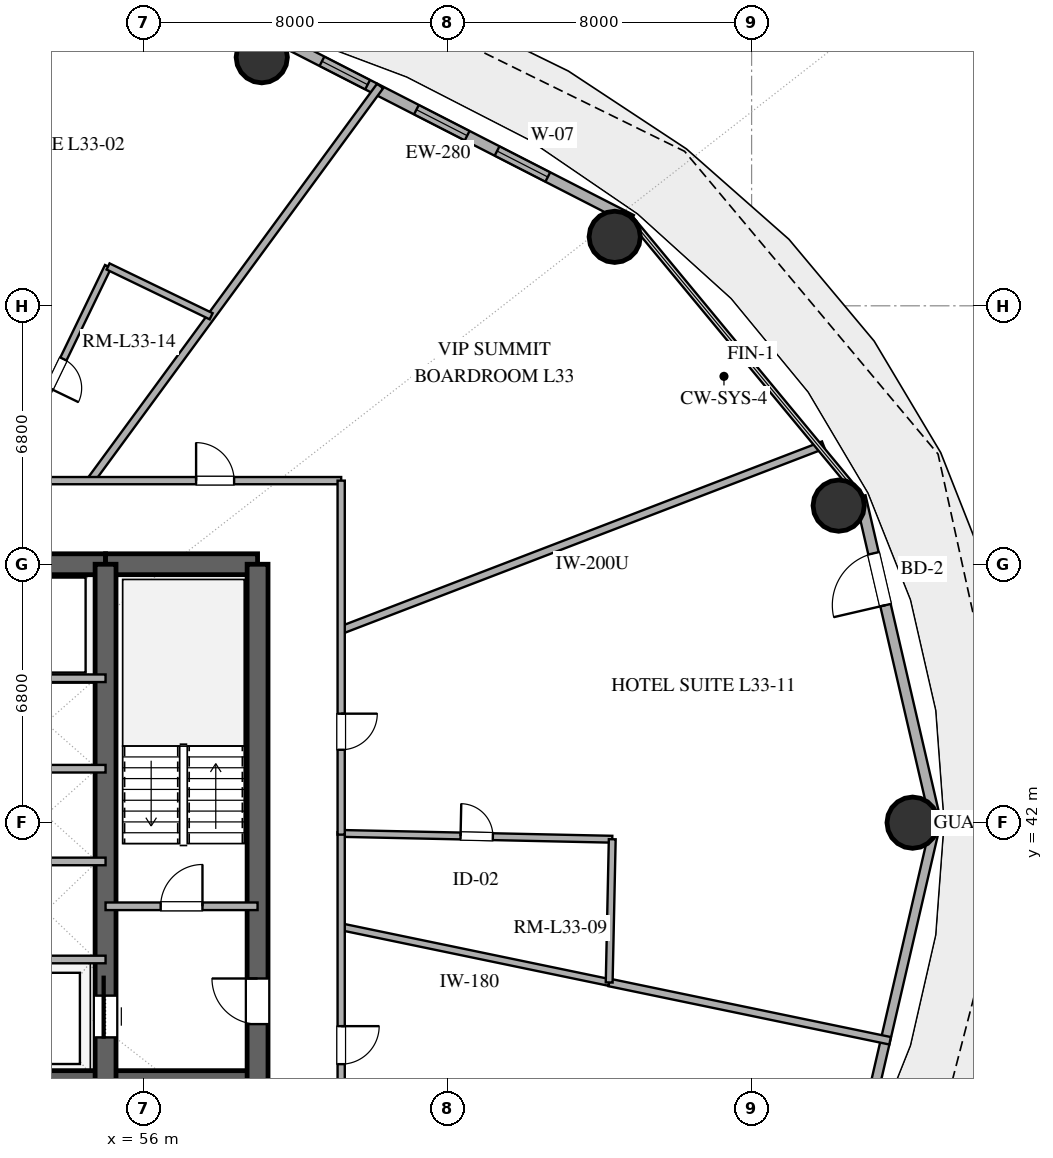
"""IFC4 building model, lengths in metres.
Left out: names, types, materials, properties, quantities, classifications, styles, units other than length and angle.
Written with IfcOpenShell. Run it as: python <this file> out.ifc"""

import sys

from ifc_helpers import new_model, si_unit, direction, frame, frame_2d, origin, origin_2d, place, context, subcontext, project, spatial, rectangle, hollow_circle, extrude, element, fill, save


model = new_model("IFC4")
c1 = context("Model", 3, precision=1e-05, world=origin(), true_north=direction((0.0, 1.0)))
c2 = subcontext(c1, "Body", "Model", "MODEL_VIEW")
j1 = project(units=[si_unit("LENGTHUNIT", "METRE"), si_unit("PLANEANGLEUNIT", "RADIAN")], contexts=[c1])
p1 = place(None, origin())
s1 = spatial("IfcSite", under=j1, at=p1, CompositionType="ELEMENT")
p2 = place(p1, origin())
s2 = spatial("IfcBuilding", under=s1, at=p2, CompositionType="ELEMENT")
p3 = place(p2, frame((0.0, 0.0, 130.8)))
s3 = spatial("IfcBuildingStorey", under=s2, at=p3, CompositionType="ELEMENT", Elevation=130.8)
p4 = place(p3, frame((41.0, 35.2, 0.0), z_axis=(0.0, 0.0, 1.0), x_axis=(1.0, 0.0, 0.0)))
e1 = element("IfcWall", 1, at=p4, inside=s3, PredefinedType="SHEAR", context=c2, shape_type="SweptSolid", body=[
    extrude(rectangle(XDim=14.0, YDim=0.55, at=frame_2d((7.0, 0.0))), origin(), (0.0, 0.0, 1.0), 3.32),
])
p5 = place(p4, frame((6.1, 0.0, 0.0)))
e2 = element("IfcOpeningElement", 2, at=p5, cuts=e1, PredefinedType="OPENING", context=c2, shape_type="SweptSolid", body=[
    extrude(rectangle(XDim=1.8, YDim=2.25, at=frame_2d((0.9, 1.125))), frame((0.0, 0.285, 0.0), z_axis=(0.0, -1.0, 0.0), x_axis=(1.0, 0.0, 0.0)), (0.0, 0.0, 1.0), 0.57),
])
p6 = place(p3, frame((55.0, 35.2, 0.0), z_axis=(0.0, 0.0, 1.0), x_axis=(1.0, 0.0, 0.0)))
e3 = element("IfcWall", 3, at=p6, inside=s3, PredefinedType="SHEAR", context=c2, shape_type="SweptSolid", body=[
    extrude(rectangle(XDim=4.0, YDim=0.55, at=frame_2d((2.0, 0.0))), origin(), (0.0, 0.0, 1.0), 3.32),
])
p7 = place(p3, frame((41.0, 48.8, 0.0), z_axis=(0.0, 0.0, 1.0), x_axis=(1.0, 0.0, 0.0)))
e4 = element("IfcWall", 4, at=p7, inside=s3, PredefinedType="SHEAR", context=c2, shape_type="SweptSolid", body=[
    extrude(rectangle(XDim=14.0, YDim=0.55, at=frame_2d((7.0, 0.0))), origin(), (0.0, 0.0, 1.0), 3.32),
])
p8 = place(p7, frame((6.1, 0.0, 0.0)))
e5 = element("IfcOpeningElement", 5, at=p8, cuts=e4, PredefinedType="OPENING", context=c2, shape_type="SweptSolid", body=[
    extrude(rectangle(XDim=1.8, YDim=2.25, at=frame_2d((0.9, 1.125))), frame((0.0, 0.285, 0.0), z_axis=(0.0, -1.0, 0.0), x_axis=(1.0, 0.0, 0.0)), (0.0, 0.0, 1.0), 0.57),
])
p9 = place(p3, frame((55.0, 48.8, 0.0), z_axis=(0.0, 0.0, 1.0), x_axis=(1.0, 0.0, 0.0)))
e6 = element("IfcWall", 6, at=p9, inside=s3, PredefinedType="SHEAR", context=c2, shape_type="SweptSolid", body=[
    extrude(rectangle(XDim=4.0, YDim=0.55, at=frame_2d((2.0, 0.0))), origin(), (0.0, 0.0, 1.0), 3.32),
])
p10 = place(p3, frame((59.0, 35.2, 0.0), z_axis=(0.0, 0.0, 1.0), x_axis=(0.0, 1.0, 0.0)))
e7 = element("IfcWall", 7, at=p10, inside=s3, PredefinedType="SHEAR", context=c2, shape_type="SweptSolid", body=[
    extrude(rectangle(XDim=13.6, YDim=0.55, at=frame_2d((6.8, 0.0))), origin(), (0.0, 0.0, 1.0), 3.32),
])
p11 = place(p10, frame((1.5, 0.0, 0.0)))
e8 = element("IfcOpeningElement", 8, at=p11, cuts=e7, PredefinedType="OPENING", context=c2, shape_type="SweptSolid", body=[
    extrude(rectangle(XDim=1.2, YDim=2.15, at=frame_2d((0.6, 1.075))), frame((0.0, 0.285, 0.0), z_axis=(0.0, -1.0, 0.0), x_axis=(1.0, 0.0, 0.0)), (0.0, 0.0, 1.0), 0.57),
])
p12 = place(p3, frame((55.0, 35.2, 0.0), z_axis=(0.0, 0.0, 1.0), x_axis=(0.0, 1.0, 0.0)))
e9 = element("IfcWall", 9, at=p12, inside=s3, PredefinedType="SHEAR", context=c2, shape_type="SweptSolid", body=[
    extrude(rectangle(XDim=13.6, YDim=0.55, at=frame_2d((6.8, 0.0))), origin(), (0.0, 0.0, 1.0), 3.32),
])
p13 = place(p12, frame((1.15, 0.0, 0.0)))
e10 = element("IfcOpeningElement", 10, at=p13, cuts=e9, PredefinedType="OPENING", context=c2, shape_type="SweptSolid", body=[
    extrude(rectangle(XDim=1.1, YDim=2.2, at=frame_2d((0.55, 1.1))), frame((0.0, 0.285, 0.0), z_axis=(0.0, -1.0, 0.0), x_axis=(1.0, 0.0, 0.0)), (0.0, 0.0, 1.0), 0.57),
])
for number, where, z_axis, x_axis in (
    (11, (76.237, 42.0, 0.0), (0.0, 0.0, 1.0), (1.0, 0.0, 0.0)),
    (12, (74.291, 50.343, 0.0), (0.0, 0.0, 1.0), (1.0, 0.0, 0.0)),
    (13, (68.398, 57.415, 0.0), (0.0, 0.0, 1.0), (1.0, 0.0, 0.0)),
    (14, (59.11, 62.141, 0.0), (0.0, 0.0, 1.0), (1.0, 0.0, 0.0)),
):
    element("IfcColumn", number, at=place(p3, frame(where, z_axis=z_axis, x_axis=x_axis)), inside=s3, PredefinedType="COLUMN", context=c2, shape_type="SweptSolid", body=[
        extrude(hollow_circle(Radius=0.675, WallThickness=0.036, at=origin_2d()), origin(), (0.0, 0.0, 1.0), 3.32),
    ])
p14 = place(p3, frame((76.849, 42.0, 0.0), z_axis=(0.0, 0.0, 1.0), x_axis=(-0.22558597182, 0.974223264616, 0.0)))
e15 = element("IfcWall", 15, at=p14, inside=s3, PredefinedType="SOLIDWALL", context=c2, shape_type="SweptSolid", body=[
    extrude(rectangle(XDim=8.811, YDim=0.28, at=frame_2d((4.405, 0.0))), origin(), (0.0, 0.0, 1.0), 3.32),
])
p15 = place(p14, frame((5.875, 0.0, 0.0)))
e16 = element("IfcOpeningElement", 16, at=p15, cuts=e15, PredefinedType="OPENING", context=c2, shape_type="SweptSolid", body=[
    extrude(rectangle(XDim=1.4, YDim=2.2, at=frame_2d((0.7, 1.1))), frame((0.0, 0.15, 0.0), z_axis=(0.0, -1.0, 0.0), x_axis=(1.0, 0.0, 0.0)), (0.0, 0.0, 1.0), 0.3),
])
p16 = place(p3, frame((68.84, 57.86, 0.0), z_axis=(0.0, 0.0, 1.0), x_axis=(-0.889959505023, 0.45603955905, 0.0)))
e17 = element("IfcWall", 17, at=p16, inside=s3, PredefinedType="SOLIDWALL", context=c2, shape_type="SweptSolid", body=[
    extrude(rectangle(XDim=10.662, YDim=0.28, at=frame_2d((5.331, 0.0))), origin(), (0.0, 0.0, 1.0), 3.32),
])
p17 = place(p16, frame((2.475, 0.0, 0.85)))
e18 = element("IfcOpeningElement", 18, at=p17, cuts=e17, PredefinedType="OPENING", context=c2, shape_type="SweptSolid", body=[
    extrude(rectangle(XDim=1.5, YDim=1.8, at=frame_2d((0.75, 0.9))), frame((0.0, 0.15, 0.0), z_axis=(0.0, -1.0, 0.0), x_axis=(1.0, 0.0, 0.0)), (0.0, 0.0, 1.0), 0.3),
])
p18 = place(p16, frame((4.86, 0.0, 0.85)))
e19 = element("IfcOpeningElement", 19, at=p18, cuts=e17, PredefinedType="OPENING", context=c2, shape_type="SweptSolid", body=[
    extrude(rectangle(XDim=1.5, YDim=1.8, at=frame_2d((0.75, 0.9))), frame((0.0, 0.15, 0.0), z_axis=(0.0, -1.0, 0.0), x_axis=(1.0, 0.0, 0.0)), (0.0, 0.0, 1.0), 0.3),
])
p19 = place(p16, frame((7.803, 0.0, 0.85)))
e20 = element("IfcOpeningElement", 20, at=p19, cuts=e17, PredefinedType="OPENING", context=c2, shape_type="SweptSolid", body=[
    extrude(rectangle(XDim=1.35, YDim=1.8, at=frame_2d((0.675, 0.9))), frame((0.0, 0.15, 0.0), z_axis=(0.0, -1.0, 0.0), x_axis=(1.0, 0.0, 0.0)), (0.0, 0.0, 1.0), 0.3),
])
p20 = place(p3, frame((74.861, 33.417, 0.0), z_axis=(0.0, 0.0, 1.0), x_axis=(0.22558597182, 0.974223264616, 0.0)))
e21 = element("IfcWall", 21, at=p20, inside=s3, PredefinedType="SOLIDWALL", context=c2, shape_type="SweptSolid", body=[
    extrude(rectangle(XDim=8.811, YDim=0.25, at=frame_2d((4.405, 0.0))), origin(), (0.0, 0.0, 1.0), 3.32),
])
p21 = place(p3, frame((55.0, 39.8, 0.0), z_axis=(0.0, 0.0, 1.0), x_axis=(1.0, 0.0, 0.0)))
e22 = element("IfcWall", 22, at=p21, inside=s3, PredefinedType="SOLIDWALL", context=c2, shape_type="SweptSolid", body=[
    extrude(rectangle(XDim=4.0, YDim=0.2, at=frame_2d((2.0, 0.0))), origin(), (0.0, 0.0, 1.0), 2.68),
])
p22 = place(p21, frame((1.45, 0.0, 0.0)))
e23 = element("IfcOpeningElement", 23, at=p22, cuts=e22, PredefinedType="OPENING", context=c2, shape_type="SweptSolid", body=[
    extrude(rectangle(XDim=1.1, YDim=2.15, at=frame_2d((0.55, 1.075))), frame((0.0, 0.11, 0.0), z_axis=(0.0, -1.0, 0.0), x_axis=(1.0, 0.0, 0.0)), (0.0, 0.0, 1.0), 0.22),
])
for number, where, z_axis, x_axis in (
    (24, (52.05, 38.4, 0.0), (0.0, 0.0, 1.0), (1.0, 0.0, 0.0)),
    (25, (52.05, 40.98, 0.0), (0.0, 0.0, 1.0), (1.0, 0.0, 0.0)),
    (26, (52.05, 43.42, 0.0), (0.0, 0.0, 1.0), (1.0, 0.0, 0.0)),
    (27, (52.05, 45.8, 0.0), (0.0, 0.0, 1.0), (1.0, 0.0, 0.0)),
):
    element("IfcWall", number, at=place(p3, frame(where, z_axis=z_axis, x_axis=x_axis)), inside=s3, PredefinedType="SOLIDWALL", context=c2, shape_type="SweptSolid", body=[
        extrude(rectangle(XDim=2.95, YDim=0.2, at=frame_2d((1.475, 0.0))), origin(), (0.0, 0.0, 1.0), 2.68),
    ])
p23 = place(p3, frame((73.888, 51.938, 0.0), z_axis=(0.0, 0.0, 1.0), x_axis=(-0.933575508152, -0.358380762009, 0.0)))
e28 = element("IfcWall", 28, at=p23, inside=s3, PredefinedType="PARTITIONING", context=c2, shape_type="SweptSolid", body=[
    extrude(rectangle(XDim=13.591, YDim=0.2, at=frame_2d((6.796, 0.0))), origin(), (0.0, 0.0, 1.0), 2.68),
])
p24 = place(p3, frame((75.643, 36.262, 0.0), z_axis=(0.0, 0.0, 1.0), x_axis=(-0.979129223201, 0.203238687937, 0.0)))
e29 = element("IfcWall", 29, at=p24, inside=s3, PredefinedType="PARTITIONING", context=c2, shape_type="SweptSolid", body=[
    extrude(rectangle(XDim=7.549, YDim=0.2, at=frame_2d((3.774, 0.0))), origin(), (0.0, 0.0, 1.0), 2.68),
])
p25 = place(p3, frame((54.605, 51.0, 0.0), z_axis=(0.0, 0.0, 1.0), x_axis=(0.591626609971, 0.806212102597, 0.0)))
e30 = element("IfcWall", 30, at=p25, inside=s3, PredefinedType="PARTITIONING", context=c2, shape_type="SweptSolid", body=[
    extrude(rectangle(XDim=12.879, YDim=0.2, at=frame_2d((6.439, 0.0))), origin(), (0.0, 0.0, 1.0), 2.68),
])
p26 = place(p3, frame((68.252, 37.796, 0.0), z_axis=(0.0, 0.0, 1.0), x_axis=(-0.979121746523, 0.20327470449, 0.0)))
e31 = element("IfcWall", 31, at=p26, inside=s3, PredefinedType="PLUMBINGWALL", context=c2, shape_type="SweptSolid", body=[
    extrude(rectangle(XDim=7.203, YDim=0.18, at=frame_2d((3.601, 0.0))), origin(), (0.0, 0.0, 1.0), 2.68),
])
p27 = place(p3, frame((61.2, 41.717, 0.0), z_axis=(0.0, 0.0, 1.0), x_axis=(0.999770544785, -0.021420965911, 0.0)))
e32 = element("IfcWall", 32, at=p27, inside=s3, PredefinedType="PLUMBINGWALL", context=c2, shape_type="SweptSolid", body=[
    extrude(rectangle(XDim=7.135, YDim=0.18, at=frame_2d((3.567, 0.0))), origin(), (0.0, 0.0, 1.0), 2.68),
])
p28 = place(p27, frame((3.142, 0.0, 0.0)))
e33 = element("IfcOpeningElement", 33, at=p28, cuts=e32, PredefinedType="OPENING", context=c2, shape_type="SweptSolid", body=[
    extrude(rectangle(XDim=0.85, YDim=2.1, at=frame_2d((0.425, 1.05))), frame((0.0, 0.1, 0.0), z_axis=(0.0, -1.0, 0.0), x_axis=(1.0, 0.0, 0.0)), (0.0, 0.0, 1.0), 0.2),
])
p29 = place(p3, frame((52.31, 51.0, 0.0), z_axis=(0.0, 0.0, 1.0), x_axis=(1.0, 0.0, 0.0)))
e34 = element("IfcWall", 34, at=p29, inside=s3, PredefinedType="PARTITIONING", context=c2, shape_type="SweptSolid", body=[
    extrude(rectangle(XDim=8.89, YDim=0.19, at=frame_2d((4.445, 0.0))), origin(), (0.0, 0.0, 1.0), 2.68),
])
p30 = place(p29, frame((5.073, 0.0, 0.0)))
e35 = element("IfcOpeningElement", 35, at=p30, cuts=e34, PredefinedType="OPENING", context=c2, shape_type="SweptSolid", body=[
    extrude(rectangle(XDim=1.0, YDim=2.2, at=frame_2d((0.5, 1.1))), frame((0.0, 0.105, 0.0), z_axis=(0.0, -1.0, 0.0), x_axis=(1.0, 0.0, 0.0)), (0.0, 0.0, 1.0), 0.21),
])
p31 = place(p3, frame((61.2, 41.749, 0.0), z_axis=(0.0, 0.0, 1.0), x_axis=(0.0, -1.0, 0.0)))
e36 = element("IfcWall", 36, at=p31, inside=s3, PredefinedType="PARTITIONING", context=c2, shape_type="SweptSolid", body=[
    extrude(rectangle(XDim=8.749, YDim=0.19, at=frame_2d((4.375, 0.0))), origin(), (0.0, 0.0, 1.0), 2.68),
])
p32 = place(p31, frame((5.103, 0.0, 0.0)))
e37 = element("IfcOpeningElement", 37, at=p32, cuts=e36, PredefinedType="OPENING", context=c2, shape_type="SweptSolid", body=[
    extrude(rectangle(XDim=1.0, YDim=2.2, at=frame_2d((0.5, 1.1))), frame((0.0, 0.105, 0.0), z_axis=(0.0, -1.0, 0.0), x_axis=(1.0, 0.0, 0.0)), (0.0, 0.0, 1.0), 0.21),
])
p33 = place(p3, frame((55.066, 56.635, 0.0), z_axis=(0.0, 0.0, 1.0), x_axis=(-0.434810168298, -0.900522136066, 0.0)))
e38 = element("IfcWall", 38, at=p33, inside=s3, PredefinedType="PLUMBINGWALL", context=c2, shape_type="SweptSolid", body=[
    extrude(rectangle(XDim=6.257, YDim=0.18, at=frame_2d((3.129, 0.0))), origin(), (0.0, 0.0, 1.0), 2.68),
])
p34 = place(p33, frame((2.704, 0.0, 0.0)))
e39 = element("IfcOpeningElement", 39, at=p34, cuts=e38, PredefinedType="OPENING", context=c2, shape_type="SweptSolid", body=[
    extrude(rectangle(XDim=0.85, YDim=2.1, at=frame_2d((0.425, 1.05))), frame((0.0, 0.1, 0.0), z_axis=(0.0, -1.0, 0.0), x_axis=(1.0, 0.0, 0.0)), (0.0, 0.0, 1.0), 0.2),
])
p35 = place(p3, frame((61.2, 51.0, 0.0), z_axis=(0.0, 0.0, 1.0), x_axis=(0.0, -1.0, 0.0)))
e40 = element("IfcWall", 40, at=p35, inside=s3, PredefinedType="PARTITIONING", context=c2, shape_type="SweptSolid", body=[
    extrude(rectangle(XDim=9.315, YDim=0.19, at=frame_2d((4.657, 0.0))), origin(), (0.0, 0.0, 1.0), 2.68),
])
p36 = place(p35, frame((6.132, 0.0, 0.0)))
e41 = element("IfcOpeningElement", 41, at=p36, cuts=e40, PredefinedType="OPENING", context=c2, shape_type="SweptSolid", body=[
    extrude(rectangle(XDim=0.95, YDim=2.15, at=frame_2d((0.475, 1.075))), frame((0.0, 0.105, 0.0), z_axis=(0.0, -1.0, 0.0), x_axis=(1.0, 0.0, 0.0)), (0.0, 0.0, 1.0), 0.21),
])
p37 = place(p3, frame((68.333, 41.564, 0.0), z_axis=(0.0, 0.0, 1.0), x_axis=(-0.021438450782, -0.999770170003, 0.0)))
e42 = element("IfcWall", 42, at=p37, inside=s3, PredefinedType="PLUMBINGWALL", context=c2, shape_type="SweptSolid", body=[
    extrude(rectangle(XDim=3.77, YDim=0.18, at=frame_2d((1.885, 0.0))), origin(), (0.0, 0.0, 1.0), 2.68),
])
p38 = place(p3, frame((57.779, 55.325, 0.0), z_axis=(0.0, 0.0, 1.0), x_axis=(-0.900534126875, 0.434785333623, 0.0)))
e43 = element("IfcWall", 43, at=p38, inside=s3, PredefinedType="PLUMBINGWALL", context=c2, shape_type="SweptSolid", body=[
    extrude(rectangle(XDim=3.012, YDim=0.18, at=frame_2d((1.506, 0.0))), origin(), (0.0, 0.0, 1.0), 2.68),
])
p39 = place(p15, origin())
e44 = element("IfcDoor", 44, at=p39, inside=s3, OperationType="SINGLE_SWING_LEFT", PredefinedType="DOOR", context=c2, shape_type="SweptSolid", body=[
    extrude(rectangle(XDim=1.4, YDim=2.2, at=frame_2d((0.7, 1.1))), frame((0.0, 0.025, 0.0), z_axis=(0.0, -1.0, 0.0), x_axis=(1.0, 0.0, 0.0)), (0.0, 0.0, 1.0), 0.05),
])
fill(e16, e44)
p40 = place(p17, origin())
e45 = element("IfcWindow", 45, at=p40, inside=s3, PartitioningType="SINGLE_PANEL", PredefinedType="WINDOW", context=c2, shape_type="SweptSolid", body=[
    extrude(rectangle(XDim=1.5, YDim=1.8, at=frame_2d((0.75, 0.9))), frame((0.0, 0.03, 0.0), z_axis=(0.0, -1.0, 0.0), x_axis=(1.0, 0.0, 0.0)), (0.0, 0.0, 1.0), 0.06),
])
fill(e18, e45)
p41 = place(p18, origin())
e46 = element("IfcWindow", 46, at=p41, inside=s3, PartitioningType="SINGLE_PANEL", PredefinedType="WINDOW", context=c2, shape_type="SweptSolid", body=[
    extrude(rectangle(XDim=1.5, YDim=1.8, at=frame_2d((0.75, 0.9))), frame((0.0, 0.03, 0.0), z_axis=(0.0, -1.0, 0.0), x_axis=(1.0, 0.0, 0.0)), (0.0, 0.0, 1.0), 0.06),
])
fill(e19, e46)
p42 = place(p19, origin())
e47 = element("IfcWindow", 47, at=p42, inside=s3, PartitioningType="SINGLE_PANEL", PredefinedType="WINDOW", context=c2, shape_type="SweptSolid", body=[
    extrude(rectangle(XDim=1.35, YDim=1.8, at=frame_2d((0.675, 0.9))), frame((0.0, 0.03, 0.0), z_axis=(0.0, -1.0, 0.0), x_axis=(1.0, 0.0, 0.0)), (0.0, 0.0, 1.0), 0.06),
])
fill(e20, e47)
p43 = place(p13, origin())
e48 = element("IfcDoor", 48, at=p43, inside=s3, OperationType="SLIDING_TO_RIGHT", PredefinedType="DOOR", context=c2, shape_type="SweptSolid", body=[
    extrude(rectangle(XDim=1.1, YDim=2.2, at=frame_2d((0.55, 1.1))), frame((0.0, 0.025, 0.0), z_axis=(0.0, -1.0, 0.0), x_axis=(1.0, 0.0, 0.0)), (0.0, 0.0, 1.0), 0.05),
])
fill(e10, e48)
p44 = place(p11, origin())
e49 = element("IfcDoor", 49, at=p44, inside=s3, OperationType="SINGLE_SWING_RIGHT", PredefinedType="DOOR", context=c2, shape_type="SweptSolid", body=[
    extrude(rectangle(XDim=1.2, YDim=2.15, at=frame_2d((0.6, 1.075))), frame((0.0, 0.025, 0.0), z_axis=(0.0, -1.0, 0.0), x_axis=(1.0, 0.0, 0.0)), (0.0, 0.0, 1.0), 0.05),
])
fill(e8, e49)
p45 = place(p22, origin())
e50 = element("IfcDoor", 50, at=p45, inside=s3, OperationType="SINGLE_SWING_RIGHT", PredefinedType="DOOR", context=c2, shape_type="SweptSolid", body=[
    extrude(rectangle(XDim=1.1, YDim=2.15, at=frame_2d((0.55, 1.075))), frame((0.0, 0.025, 0.0), z_axis=(0.0, -1.0, 0.0), x_axis=(1.0, 0.0, 0.0)), (0.0, 0.0, 1.0), 0.05),
])
fill(e23, e50)
p46 = place(p28, origin())
e51 = element("IfcDoor", 51, at=p46, inside=s3, OperationType="SINGLE_SWING_LEFT", PredefinedType="DOOR", context=c2, shape_type="SweptSolid", body=[
    extrude(rectangle(XDim=0.85, YDim=2.1, at=frame_2d((0.425, 1.05))), frame((0.0, 0.025, 0.0), z_axis=(0.0, -1.0, 0.0), x_axis=(1.0, 0.0, 0.0)), (0.0, 0.0, 1.0), 0.05),
])
fill(e33, e51)
p47 = place(p30, origin())
e52 = element("IfcDoor", 52, at=p47, inside=s3, OperationType="SINGLE_SWING_LEFT", PredefinedType="DOOR", context=c2, shape_type="SweptSolid", body=[
    extrude(rectangle(XDim=1.0, YDim=2.2, at=frame_2d((0.5, 1.1))), frame((0.0, 0.025, 0.0), z_axis=(0.0, -1.0, 0.0), x_axis=(1.0, 0.0, 0.0)), (0.0, 0.0, 1.0), 0.05),
])
fill(e35, e52)
p48 = place(p32, origin())
e53 = element("IfcDoor", 53, at=p48, inside=s3, OperationType="SINGLE_SWING_LEFT", PredefinedType="DOOR", context=c2, shape_type="SweptSolid", body=[
    extrude(rectangle(XDim=1.0, YDim=2.2, at=frame_2d((0.5, 1.1))), frame((0.0, 0.025, 0.0), z_axis=(0.0, -1.0, 0.0), x_axis=(1.0, 0.0, 0.0)), (0.0, 0.0, 1.0), 0.05),
])
fill(e37, e53)
p49 = place(p34, origin())
e54 = element("IfcDoor", 54, at=p49, inside=s3, OperationType="SINGLE_SWING_RIGHT", PredefinedType="DOOR", context=c2, shape_type="SweptSolid", body=[
    extrude(rectangle(XDim=0.85, YDim=2.1, at=frame_2d((0.425, 1.05))), frame((0.0, 0.025, 0.0), z_axis=(0.0, -1.0, 0.0), x_axis=(1.0, 0.0, 0.0)), (0.0, 0.0, 1.0), 0.05),
])
fill(e39, e54)
p50 = place(p36, origin())
e55 = element("IfcDoor", 55, at=p50, inside=s3, OperationType="SINGLE_SWING_LEFT", PredefinedType="DOOR", context=c2, shape_type="SweptSolid", body=[
    extrude(rectangle(XDim=0.95, YDim=2.15, at=frame_2d((0.475, 1.075))), frame((0.0, 0.025, 0.0), z_axis=(0.0, -1.0, 0.0), x_axis=(1.0, 0.0, 0.0)), (0.0, 0.0, 1.0), 0.05),
])
fill(e41, e55)
save(model, sys.argv[1])
